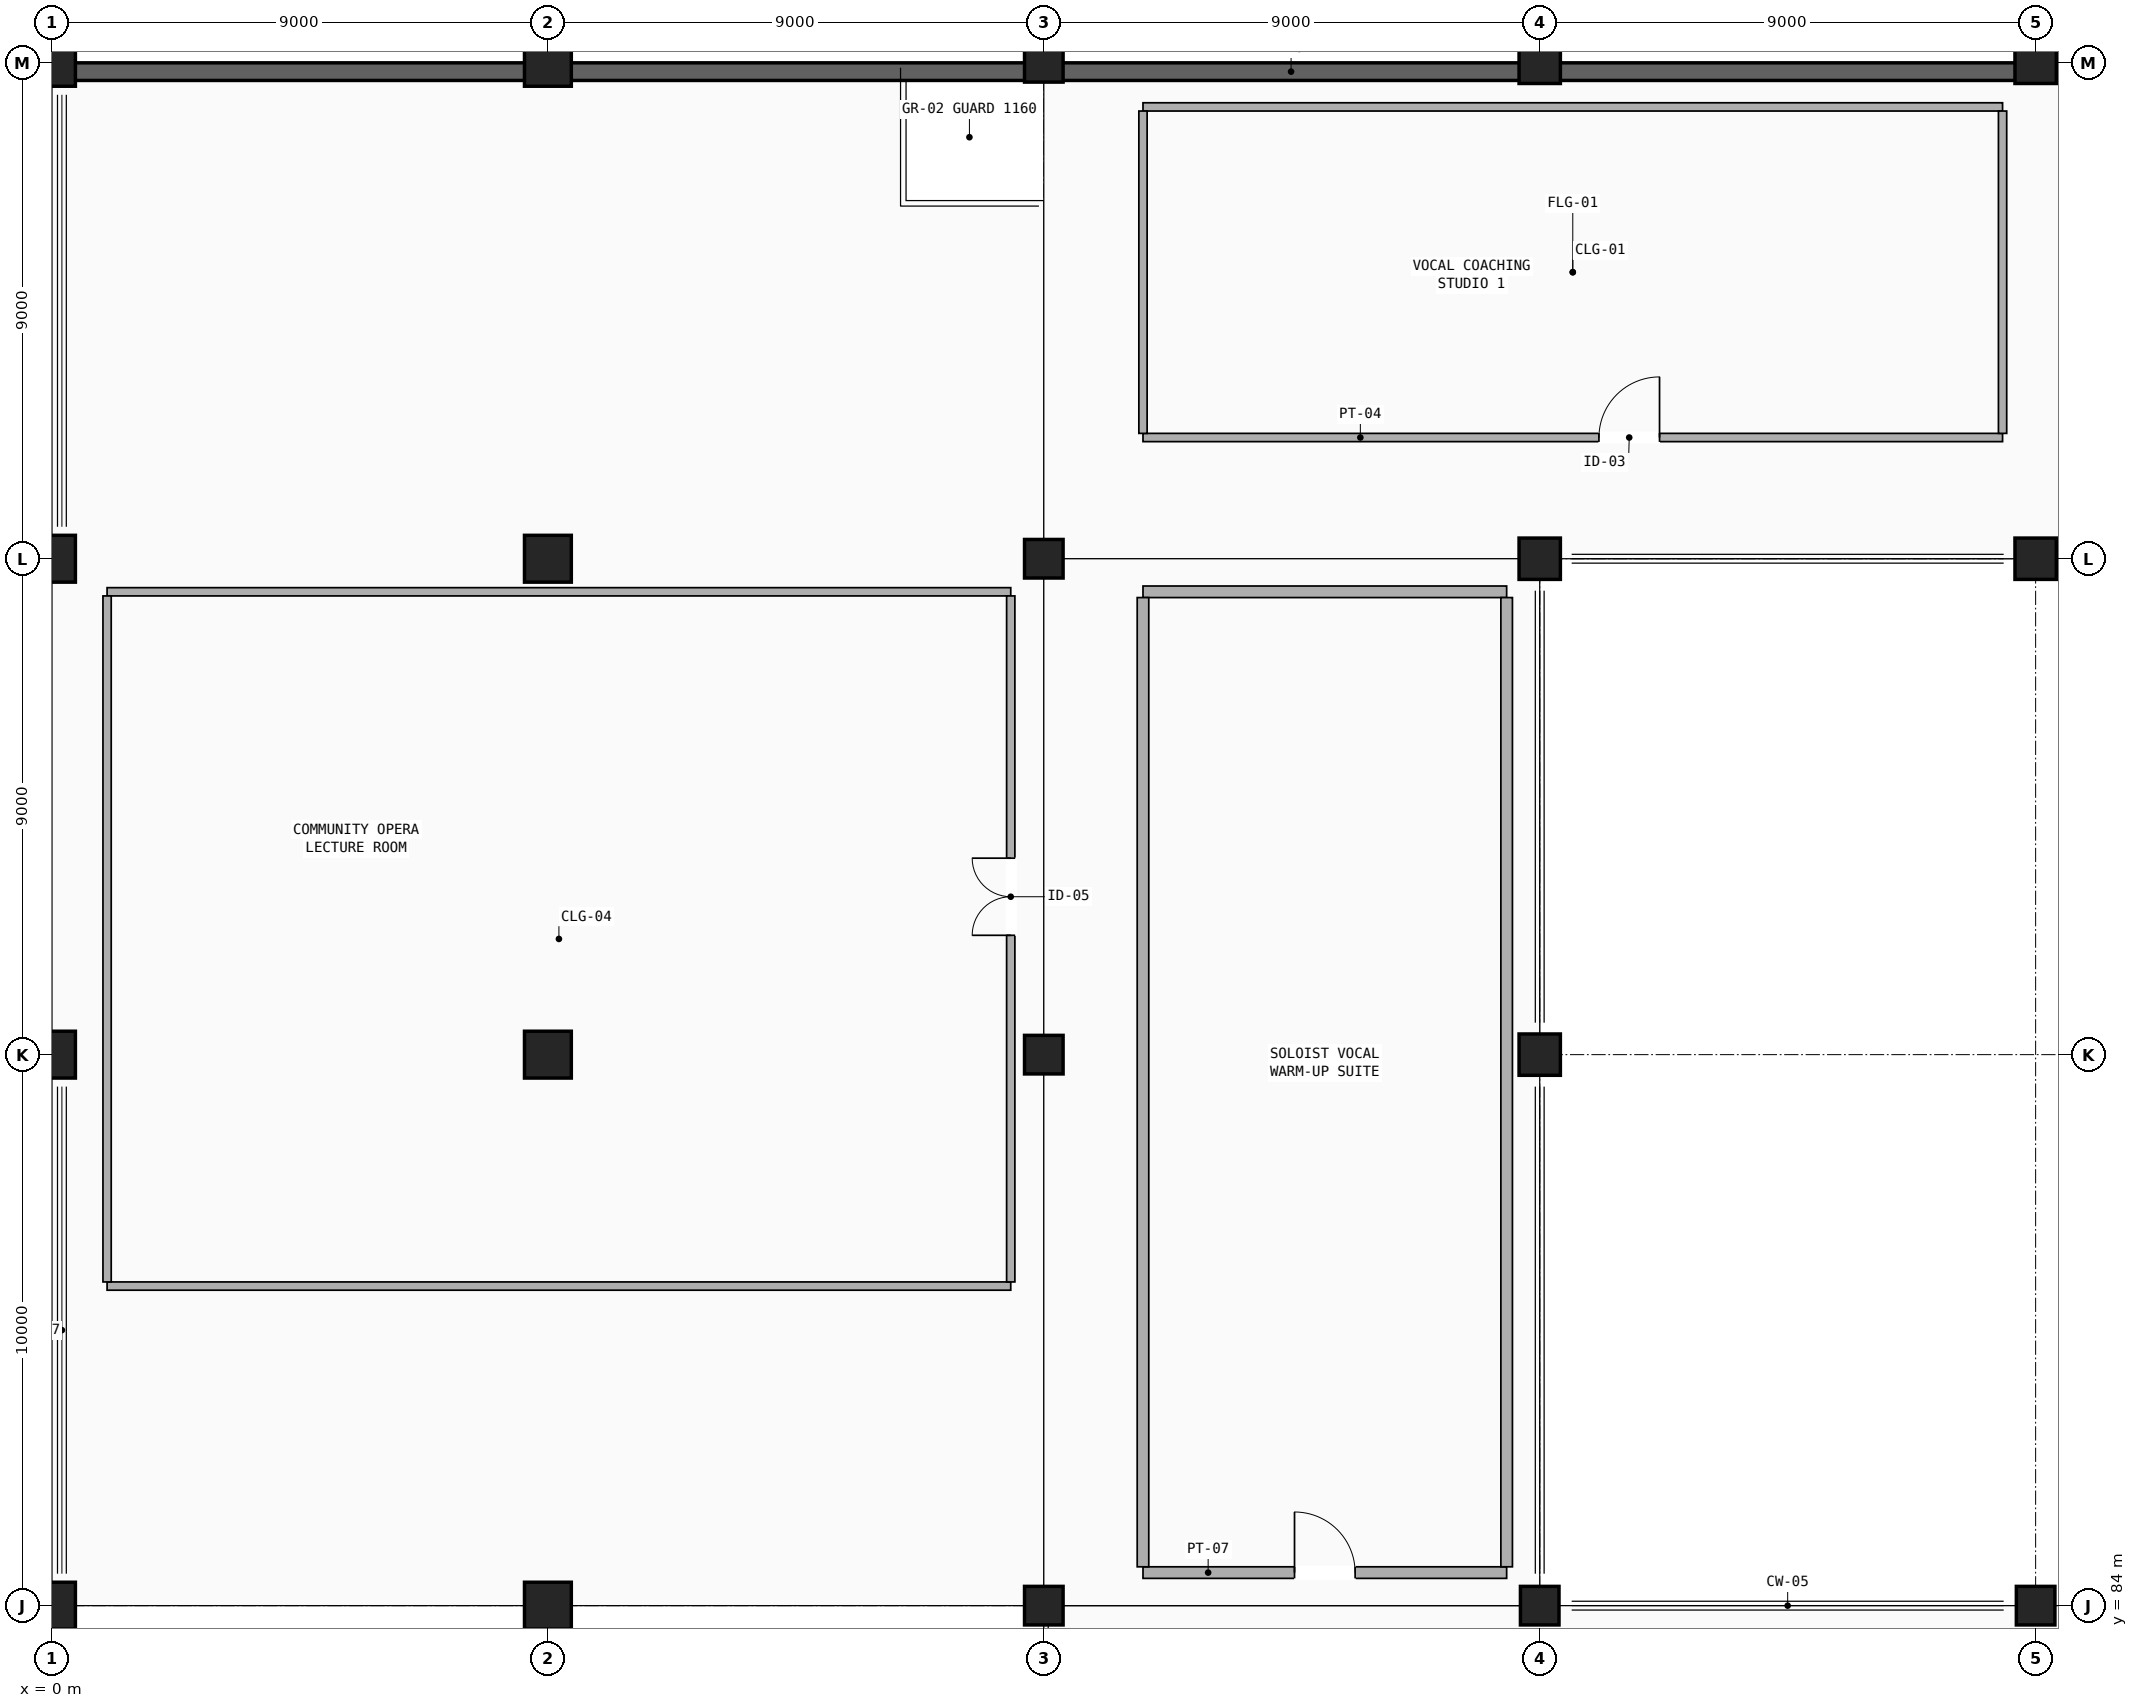
"""IFC4 building model, lengths in metres.
Left out: names, types, materials, properties, quantities, classifications, styles, units other than length and angle.
Written with IfcOpenShell. Run it as: python <this file> out.ifc"""

import sys

from ifc_helpers import new_model, si_unit, direction, frame, frame_2d, origin, origin_2d, place, context, subcontext, project, spatial, rectangle, circle, extrude, element, fill, save


model = new_model("IFC4")
c1 = context("Model", 3, precision=1e-05, world=origin(), true_north=direction((0.0, 1.0)))
c2 = subcontext(c1, "Body", "Model", "MODEL_VIEW")
j1 = project(units=[si_unit("LENGTHUNIT", "METRE"), si_unit("PLANEANGLEUNIT", "RADIAN")], contexts=[c1])
p1 = place(None, origin())
s1 = spatial("IfcSite", under=j1, at=p1, CompositionType="ELEMENT")
p2 = place(p1, origin())
s2 = spatial("IfcBuilding", under=s1, at=p2, CompositionType="ELEMENT")
p3 = place(p2, frame((0.0, 0.0, 5.1)))
s3 = spatial("IfcBuildingStorey", under=s2, at=p3, CompositionType="ELEMENT", Elevation=5.1)
for number, where, z_axis, x_axis in (
    (1, (0.0, 84.0, 0.0), (0.0, 0.0, 1.0), (1.0, 0.0, 0.0)),
    (2, (0.0, 94.0, 0.0), (0.0, 0.0, 1.0), (1.0, 0.0, 0.0)),
    (3, (0.0, 103.0, 0.0), (0.0, 0.0, 1.0), (1.0, 0.0, 0.0)),
    (4, (0.0, 112.0, 0.0), (0.0, 0.0, 1.0), (1.0, 0.0, 0.0)),
    (5, (9.0, 84.0, 0.0), (0.0, 0.0, 1.0), (1.0, 0.0, 0.0)),
    (6, (9.0, 94.0, 0.0), (0.0, 0.0, 1.0), (1.0, 0.0, 0.0)),
    (7, (9.0, 103.0, 0.0), (0.0, 0.0, 1.0), (1.0, 0.0, 0.0)),
    (8, (9.0, 112.0, 0.0), (0.0, 0.0, 1.0), (1.0, 0.0, 0.0)),
):
    element("IfcColumn", number, at=place(p3, frame(where, z_axis=z_axis, x_axis=x_axis)), inside=s3, PredefinedType="COLUMN", context=c2, shape_type="SweptSolid", body=[
        extrude(circle(Radius=0.425, at=origin_2d()), origin(), (0.0, 0.0, 1.0), 4.42),
    ])
for number, where, z_axis, x_axis in (
    (9, (18.0, 84.0, 0.0), (0.0, 0.0, 1.0), (1.0, 0.0, 0.0)),
    (10, (18.0, 94.0, 0.0), (0.0, 0.0, 1.0), (1.0, 0.0, 0.0)),
    (11, (18.0, 103.0, 0.0), (0.0, 0.0, 1.0), (1.0, 0.0, 0.0)),
    (12, (18.0, 112.0, 0.0), (0.0, 0.0, 1.0), (1.0, 0.0, 0.0)),
    (13, (27.0, 84.0, 0.0), (0.0, 0.0, 1.0), (1.0, 0.0, 0.0)),
):
    element("IfcColumn", number, at=place(p3, frame(where, z_axis=z_axis, x_axis=x_axis)), inside=s3, PredefinedType="COLUMN", context=c2, shape_type="SweptSolid", body=[
        extrude(rectangle(XDim=0.7, YDim=0.7, at=origin_2d()), origin(), (0.0, 0.0, 1.0), 4.42),
    ])
for number, where, z_axis, x_axis in (
    (14, (27.0, 94.0, 0.0), (0.0, 0.0, 1.0), (1.0, 0.0, 0.0)),
    (15, (27.0, 103.0, 0.0), (0.0, 0.0, 1.0), (1.0, 0.0, 0.0)),
    (16, (27.0, 112.0, 0.0), (0.0, 0.0, 1.0), (1.0, 0.0, 0.0)),
):
    element("IfcColumn", number, at=place(p3, frame(where, z_axis=z_axis, x_axis=x_axis)), inside=s3, PredefinedType="COLUMN", context=c2, shape_type="SweptSolid", body=[
        extrude(rectangle(XDim=0.75, YDim=0.75, at=origin_2d()), origin(), (0.0, 0.0, 1.0), 4.42),
    ])
p4 = place(p3, frame((36.0, 84.0, 0.0), z_axis=(0.0, 0.0, 1.0), x_axis=(1.0, 0.0, 0.0)))
e17 = element("IfcColumn", 17, at=p4, inside=s3, PredefinedType="COLUMN", context=c2, shape_type="SweptSolid", body=[
    extrude(rectangle(XDim=0.7, YDim=0.7, at=origin_2d()), origin(), (0.0, 0.0, 1.0), 4.42),
])
for number, where, z_axis, x_axis in (
    (18, (36.0, 103.0, 0.0), (0.0, 0.0, 1.0), (1.0, 0.0, 0.0)),
    (19, (36.0, 112.0, 0.0), (0.0, 0.0, 1.0), (1.0, 0.0, 0.0)),
):
    element("IfcColumn", number, at=place(p3, frame(where, z_axis=z_axis, x_axis=x_axis)), inside=s3, PredefinedType="COLUMN", context=c2, shape_type="SweptSolid", body=[
        extrude(rectangle(XDim=0.75, YDim=0.75, at=origin_2d()), origin(), (0.0, 0.0, 1.0), 4.42),
    ])
p5 = place(p3, frame((0.35, 111.84, 0.0), z_axis=(0.0, 0.0, 1.0), x_axis=(1.0, 0.0, 0.0)))
e20 = element("IfcWall", 20, at=p5, inside=s3, PredefinedType="SHEAR", context=c2, shape_type="SweptSolid", body=[
    extrude(rectangle(XDim=62.95, YDim=0.32, at=frame_2d((31.475, 0.0))), origin(), (0.0, 0.0, 1.0), 4.42),
])
p6 = place(p3, frame((19.8, 105.2, 0.0), z_axis=(0.0, 0.0, 1.0), x_axis=(1.0, 0.0, 0.0)))
e21 = element("IfcWall", 21, at=p6, inside=s3, PredefinedType="PARTITIONING", context=c2, shape_type="SweptSolid", body=[
    extrude(rectangle(XDim=15.6, YDim=0.15, at=frame_2d((7.8, 0.0))), origin(), (0.0, 0.0, 1.0), 3.49),
])
p7 = place(p6, frame((8.274, 0.0, 0.0)))
e22 = element("IfcOpeningElement", 22, at=p7, cuts=e21, PredefinedType="OPENING", context=c2, shape_type="SweptSolid", body=[
    extrude(rectangle(XDim=1.1, YDim=2.2, at=frame_2d((0.55, 1.1))), frame((0.0, 0.085, 0.0), z_axis=(0.0, -1.0, 0.0), x_axis=(1.0, 0.0, 0.0)), (0.0, 0.0, 1.0), 0.17),
])
p8 = place(p3, frame((19.8, 111.2, 0.0), z_axis=(0.0, 0.0, 1.0), x_axis=(1.0, 0.0, 0.0)))
e23 = element("IfcWall", 23, at=p8, inside=s3, PredefinedType="PARTITIONING", context=c2, shape_type="SweptSolid", body=[
    extrude(rectangle(XDim=15.6, YDim=0.15, at=frame_2d((7.8, 0.0))), origin(), (0.0, 0.0, 1.0), 3.49),
])
p9 = place(p3, frame((19.8, 105.275, 0.0), z_axis=(0.0, 0.0, 1.0), x_axis=(0.0, 1.0, 0.0)))
e24 = element("IfcWall", 24, at=p9, inside=s3, PredefinedType="PARTITIONING", context=c2, shape_type="SweptSolid", body=[
    extrude(rectangle(XDim=5.85, YDim=0.15, at=frame_2d((2.925, 0.0))), origin(), (0.0, 0.0, 1.0), 3.887),
])
p10 = place(p3, frame((35.4, 105.275, 0.0), z_axis=(0.0, 0.0, 1.0), x_axis=(0.0, 1.0, 0.0)))
e25 = element("IfcWall", 25, at=p10, inside=s3, PredefinedType="PARTITIONING", context=c2, shape_type="SweptSolid", body=[
    extrude(rectangle(XDim=5.85, YDim=0.15, at=frame_2d((2.925, 0.0))), origin(), (0.0, 0.0, 1.0), 3.68),
])
for number, where, z_axis, x_axis in (
    (26, (1.0, 89.8, 0.0), (0.0, 0.0, 1.0), (1.0, 0.0, 0.0)),
    (27, (1.0, 102.4, 0.0), (0.0, 0.0, 1.0), (1.0, 0.0, 0.0)),
):
    element("IfcWall", number, at=place(p3, frame(where, z_axis=z_axis, x_axis=x_axis)), inside=s3, PredefinedType="PARTITIONING", context=c2, shape_type="SweptSolid", body=[
        extrude(rectangle(XDim=16.4, YDim=0.15, at=frame_2d((8.2, 0.0))), origin(), (0.0, 0.0, 1.0), 4.16),
    ])
p11 = place(p3, frame((1.0, 89.875, 0.0), z_axis=(0.0, 0.0, 1.0), x_axis=(0.0, 1.0, 0.0)))
e28 = element("IfcWall", 28, at=p11, inside=s3, PredefinedType="PARTITIONING", context=c2, shape_type="SweptSolid", body=[
    extrude(rectangle(XDim=12.45, YDim=0.15, at=frame_2d((6.225, 0.0))), origin(), (0.0, 0.0, 1.0), 3.617),
])
p12 = place(p3, frame((17.4, 89.875, 0.0), z_axis=(0.0, 0.0, 1.0), x_axis=(0.0, 1.0, 0.0)))
e29 = element("IfcWall", 29, at=p12, inside=s3, PredefinedType="PARTITIONING", context=c2, shape_type="SweptSolid", body=[
    extrude(rectangle(XDim=12.45, YDim=0.15, at=frame_2d((6.225, 0.0))), origin(), (0.0, 0.0, 1.0), 3.617),
])
p13 = place(p12, frame((6.291, 0.0, 0.0)))
e30 = element("IfcOpeningElement", 30, at=p13, cuts=e29, PredefinedType="OPENING", context=c2, shape_type="SweptSolid", body=[
    extrude(rectangle(XDim=1.4, YDim=2.2, at=frame_2d((0.7, 1.1))), frame((0.0, 0.085, 0.0), z_axis=(0.0, -1.0, 0.0), x_axis=(1.0, 0.0, 0.0)), (0.0, 0.0, 1.0), 0.17),
])
p14 = place(p3, frame((19.8, 84.6, 0.0), z_axis=(0.0, 0.0, 1.0), x_axis=(1.0, 0.0, 0.0)))
e31 = element("IfcWall", 31, at=p14, inside=s3, PredefinedType="PARTITIONING", context=c2, shape_type="SweptSolid", body=[
    extrude(rectangle(XDim=6.6, YDim=0.21, at=frame_2d((3.3, 0.0))), origin(), (0.0, 0.0, 1.0), 4.16),
])
p15 = place(p14, frame((2.75, 0.0, 0.0)))
e32 = element("IfcOpeningElement", 32, at=p15, cuts=e31, PredefinedType="OPENING", context=c2, shape_type="SweptSolid", body=[
    extrude(rectangle(XDim=1.1, YDim=2.2, at=frame_2d((0.55, 1.1))), frame((0.0, 0.115, 0.0), z_axis=(0.0, -1.0, 0.0), x_axis=(1.0, 0.0, 0.0)), (0.0, 0.0, 1.0), 0.23),
])
p16 = place(p3, frame((19.8, 102.4, 0.0), z_axis=(0.0, 0.0, 1.0), x_axis=(1.0, 0.0, 0.0)))
e33 = element("IfcWall", 33, at=p16, inside=s3, PredefinedType="PARTITIONING", context=c2, shape_type="SweptSolid", body=[
    extrude(rectangle(XDim=6.6, YDim=0.21, at=frame_2d((3.3, 0.0))), origin(), (0.0, 0.0, 1.0), 4.16),
])
for number, where, z_axis, x_axis in (
    (34, (19.8, 84.705, 0.0), (0.0, 0.0, 1.0), (0.0, 1.0, 0.0)),
    (35, (26.4, 84.705, 0.0), (0.0, 0.0, 1.0), (0.0, 1.0, 0.0)),
):
    element("IfcWall", number, at=place(p3, frame(where, z_axis=z_axis, x_axis=x_axis)), inside=s3, PredefinedType="PARTITIONING", context=c2, shape_type="SweptSolid", body=[
        extrude(rectangle(XDim=17.59, YDim=0.21, at=frame_2d((8.795, 0.0))), origin(), (0.0, 0.0, 1.0), 3.39),
    ])
p17 = place(p7, origin())
e36 = element("IfcDoor", 36, at=p17, inside=s3, OperationType="SINGLE_SWING_RIGHT", PredefinedType="DOOR", context=c2, shape_type="SweptSolid", body=[
    extrude(rectangle(XDim=1.1, YDim=2.2, at=frame_2d((0.55, 1.1))), frame((0.0, 0.025, 0.0), z_axis=(0.0, -1.0, 0.0), x_axis=(1.0, 0.0, 0.0)), (0.0, 0.0, 1.0), 0.05),
])
fill(e22, e36)
p18 = place(p13, origin())
e37 = element("IfcDoor", 37, at=p18, inside=s3, OperationType="DOUBLE_DOOR_SINGLE_SWING", PredefinedType="DOOR", context=c2, shape_type="SweptSolid", body=[
    extrude(rectangle(XDim=1.4, YDim=2.2, at=frame_2d((0.7, 1.1))), frame((0.0, 0.025, 0.0), z_axis=(0.0, -1.0, 0.0), x_axis=(1.0, 0.0, 0.0)), (0.0, 0.0, 1.0), 0.05),
])
fill(e30, e37)
p19 = place(p15, origin())
e38 = element("IfcDoor", 38, at=p19, inside=s3, OperationType="SINGLE_SWING_LEFT", PredefinedType="DOOR", context=c2, shape_type="SweptSolid", body=[
    extrude(rectangle(XDim=1.1, YDim=2.2, at=frame_2d((0.55, 1.1))), frame((0.0, 0.025, 0.0), z_axis=(0.0, -1.0, 0.0), x_axis=(1.0, 0.0, 0.0)), (0.0, 0.0, 1.0), 0.05),
])
fill(e32, e38)
save(model, sys.argv[1])
